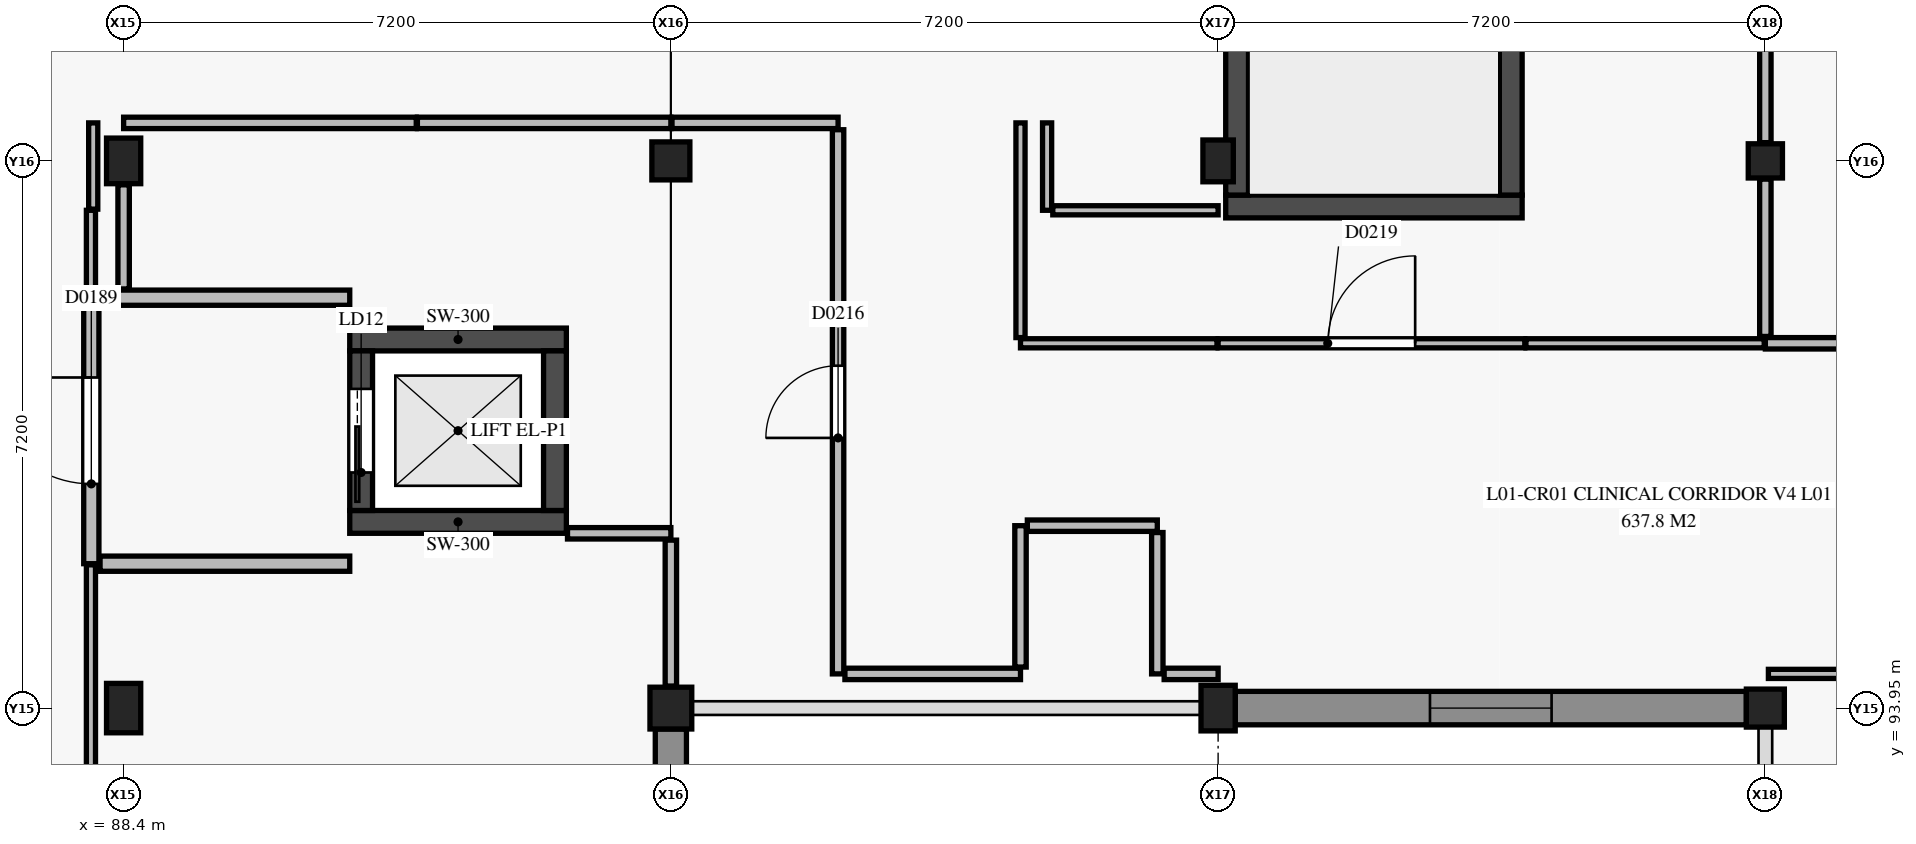
"""IFC4 building model, lengths in metres.
Left out: names, types, materials, properties, quantities, classifications, styles, units other than length and angle.
Written with IfcOpenShell. Run it as: python <this file> out.ifc"""

import sys

from ifc_helpers import new_model, si_unit, direction, frame, frame_2d, origin, origin_2d, place, context, subcontext, project, spatial, rectangle, extrude, element, fill, save


model = new_model("IFC4")
c1 = context("Model", 3, precision=1e-05, world=origin(), true_north=direction((0.0, 1.0)))
c2 = subcontext(c1, "Body", "Model", "MODEL_VIEW")
j1 = project(units=[si_unit("LENGTHUNIT", "METRE"), si_unit("PLANEANGLEUNIT", "RADIAN")], contexts=[c1])
p1 = place(None, origin())
s1 = spatial("IfcSite", under=j1, at=p1, CompositionType="ELEMENT")
p2 = place(p1, origin())
s2 = spatial("IfcBuilding", under=s1, at=p2, CompositionType="ELEMENT")
p3 = place(p2, frame((0.0, 0.0, 4.8)))
s3 = spatial("IfcBuildingStorey", under=s2, at=p3, CompositionType="ELEMENT", Elevation=4.8)
p4 = place(p3, frame((88.4, 93.95, 0.0), z_axis=(0.0, 0.0, 1.0), x_axis=(1.0, 0.0, 0.0)))
e1 = element("IfcColumn", 1, at=p4, inside=s3, PredefinedType="COLUMN", context=c2, shape_type="SweptSolid", body=[
    extrude(rectangle(XDim=0.45, YDim=0.65, at=origin_2d()), origin(), (0.0, 0.0, 1.0), 4.2),
])
p5 = place(p3, frame((88.4, 101.15, 0.0), z_axis=(0.0, 0.0, 1.0), x_axis=(1.0, 0.0, 0.0)))
e2 = element("IfcColumn", 2, at=p5, inside=s3, PredefinedType="COLUMN", context=c2, shape_type="SweptSolid", body=[
    extrude(rectangle(XDim=0.45, YDim=0.6, at=origin_2d()), origin(), (0.0, 0.0, 1.0), 4.2),
])
p6 = place(p3, frame((95.6, 93.95, 0.0), z_axis=(0.0, 0.0, 1.0), x_axis=(1.0, 0.0, 0.0)))
e3 = element("IfcColumn", 3, at=p6, inside=s3, PredefinedType="COLUMN", context=c2, shape_type="SweptSolid", body=[
    extrude(rectangle(XDim=0.55, YDim=0.55, at=origin_2d()), origin(), (0.0, 0.0, 1.0), 4.2),
])
p7 = place(p3, frame((95.6, 101.15, 0.0), z_axis=(0.0, 0.0, 1.0), x_axis=(1.0, 0.0, 0.0)))
e4 = element("IfcColumn", 4, at=p7, inside=s3, PredefinedType="COLUMN", context=c2, shape_type="SweptSolid", body=[
    extrude(rectangle(XDim=0.5, YDim=0.5, at=origin_2d()), origin(), (0.0, 0.0, 1.0), 4.2),
])
p8 = place(p3, frame((102.8, 93.95, 0.0), z_axis=(0.0, 0.0, 1.0), x_axis=(1.0, 0.0, 0.0)))
e5 = element("IfcColumn", 5, at=p8, inside=s3, PredefinedType="COLUMN", context=c2, shape_type="SweptSolid", body=[
    extrude(rectangle(XDim=0.45, YDim=0.6, at=origin_2d()), origin(), (0.0, 0.0, 1.0), 4.2),
])
p9 = place(p3, frame((102.8, 101.15, 0.0), z_axis=(0.0, 0.0, 1.0), x_axis=(1.0, 0.0, 0.0)))
e6 = element("IfcColumn", 6, at=p9, inside=s3, PredefinedType="COLUMN", context=c2, shape_type="SweptSolid", body=[
    extrude(rectangle(XDim=0.4, YDim=0.55, at=origin_2d()), origin(), (0.0, 0.0, 1.0), 4.2),
])
p10 = place(p3, frame((110.0, 93.95, 0.0), z_axis=(0.0, 0.0, 1.0), x_axis=(1.0, 0.0, 0.0)))
e7 = element("IfcColumn", 7, at=p10, inside=s3, PredefinedType="COLUMN", context=c2, shape_type="SweptSolid", body=[
    extrude(rectangle(XDim=0.5, YDim=0.5, at=origin_2d()), origin(), (0.0, 0.0, 1.0), 4.2),
])
p11 = place(p3, frame((110.0, 101.15, 0.0), z_axis=(0.0, 0.0, 1.0), x_axis=(1.0, 0.0, 0.0)))
e8 = element("IfcColumn", 8, at=p11, inside=s3, PredefinedType="COLUMN", context=c2, shape_type="SweptSolid", body=[
    extrude(rectangle(XDim=0.45, YDim=0.45, at=origin_2d()), origin(), (0.0, 0.0, 1.0), 4.2),
])
p12 = place(p3, frame((102.9, 100.55, 0.0), z_axis=(0.0, 0.0, 1.0), x_axis=(1.0, 0.0, 0.0)))
e9 = element("IfcWall", 9, at=p12, inside=s3, PredefinedType="SHEAR", context=c2, shape_type="SweptSolid", body=[
    extrude(rectangle(XDim=3.9, YDim=0.3, at=frame_2d((1.95, 0.0))), origin(), (0.0, 0.0, 1.0), 3.95),
])
p13 = place(p3, frame((103.05, 100.7, 0.0), z_axis=(0.0, 0.0, 1.0), x_axis=(0.0, 1.0, 0.0)))
e10 = element("IfcWall", 10, at=p13, inside=s3, PredefinedType="SHEAR", context=c2, shape_type="SweptSolid", body=[
    extrude(rectangle(XDim=7.3, YDim=0.3, at=frame_2d((3.65, 0.0))), origin(), (0.0, 0.0, 1.0), 3.95),
])
p14 = place(p13, frame((5.68, 0.0, 0.0)))
e11 = element("IfcOpeningElement", 11, at=p14, cuts=e10, PredefinedType="OPENING", context=c2, shape_type="SweptSolid", body=[
    extrude(rectangle(XDim=1.5, YDim=2.15, at=frame_2d((0.75, 1.075))), frame((0.0, 0.16, 0.0), z_axis=(0.0, -1.0, 0.0), x_axis=(1.0, 0.0, 0.0)), (0.0, 0.0, 1.0), 0.32),
])
p15 = place(p3, frame((106.65, 100.7, 0.0), z_axis=(0.0, 0.0, 1.0), x_axis=(0.0, 1.0, 0.0)))
e12 = element("IfcWall", 12, at=p15, inside=s3, PredefinedType="SHEAR", context=c2, shape_type="SweptSolid", body=[
    extrude(rectangle(XDim=7.3, YDim=0.3, at=frame_2d((3.65, 0.0))), origin(), (0.0, 0.0, 1.0), 3.95),
])
for number, where, z_axis, x_axis in (
    (13, (91.375, 96.4, 0.0), (0.0, 0.0, 1.0), (1.0, 0.0, 0.0)),
    (14, (91.375, 98.8, 0.0), (0.0, 0.0, 1.0), (1.0, 0.0, 0.0)),
):
    element("IfcWall", number, at=place(p3, frame(where, z_axis=z_axis, x_axis=x_axis)), inside=s3, PredefinedType="SHEAR", context=c2, shape_type="SweptSolid", body=[
        extrude(rectangle(XDim=2.85, YDim=0.3, at=frame_2d((1.425, 0.0))), origin(), (0.0, 0.0, 1.0), 3.95),
    ])
p16 = place(p3, frame((91.525, 96.55, 0.0), z_axis=(0.0, 0.0, 1.0), x_axis=(0.0, 1.0, 0.0)))
e15 = element("IfcWall", 15, at=p16, inside=s3, PredefinedType="SHEAR", context=c2, shape_type="SweptSolid", body=[
    extrude(rectangle(XDim=2.1, YDim=0.3, at=frame_2d((1.05, 0.0))), origin(), (0.0, 0.0, 1.0), 3.95),
])
p17 = place(p16, frame((0.5, 0.0, 0.0)))
e16 = element("IfcOpeningElement", 16, at=p17, cuts=e15, PredefinedType="OPENING", context=c2, shape_type="SweptSolid", body=[
    extrude(rectangle(XDim=1.1, YDim=2.15, at=frame_2d((0.55, 1.075))), frame((0.0, 0.16, 0.0), z_axis=(0.0, -1.0, 0.0), x_axis=(1.0, 0.0, 0.0)), (0.0, 0.0, 1.0), 0.32),
])
p18 = place(p3, frame((94.075, 96.55, 0.0), z_axis=(0.0, 0.0, 1.0), x_axis=(0.0, 1.0, 0.0)))
e17 = element("IfcWall", 17, at=p18, inside=s3, PredefinedType="SHEAR", context=c2, shape_type="SweptSolid", body=[
    extrude(rectangle(XDim=2.1, YDim=0.3, at=frame_2d((1.05, 0.0))), origin(), (0.0, 0.0, 1.0), 3.95),
])
p19 = place(p3, frame((109.75, 93.95, 0.0), z_axis=(0.0, 0.0, 1.0), x_axis=(-1.0, 0.0, 0.0)))
e18 = element("IfcWall", 18, at=p19, inside=s3, PredefinedType="USERDEFINED", context=c2, shape_type="SweptSolid", body=[
    extrude(rectangle(XDim=6.725, YDim=0.44, at=frame_2d((3.363, 0.0))), origin(), (0.0, 0.0, 1.0), 3.13),
])
p20 = place(p19, frame((2.562, 0.0, 0.6)))
e19 = element("IfcOpeningElement", 19, at=p20, cuts=e18, PredefinedType="OPENING", context=c2, shape_type="SweptSolid", body=[
    extrude(rectangle(XDim=1.6, YDim=2.2, at=frame_2d((0.8, 1.1))), frame((0.0, 0.23, 0.0), z_axis=(0.0, -1.0, 0.0), x_axis=(1.0, 0.0, 0.0)), (0.0, 0.0, 1.0), 0.46),
])
p21 = place(p3, frame((95.6, 93.675, 0.0), z_axis=(0.0, 0.0, 1.0), x_axis=(0.0, -1.0, 0.0)))
e20 = element("IfcWall", 20, at=p21, inside=s3, PredefinedType="USERDEFINED", context=c2, shape_type="SweptSolid", body=[
    extrude(rectangle(XDim=6.625, YDim=0.41, at=frame_2d((3.312, 0.0))), origin(), (0.0, 0.0, 1.0), 3.13),
])
p22 = place(p21, frame((1.252, 0.0, 0.9)))
e21 = element("IfcOpeningElement", 21, at=p22, cuts=e20, PredefinedType="OPENING", context=c2, shape_type="SweptSolid", body=[
    extrude(rectangle(XDim=0.6, YDim=1.8, at=frame_2d((0.3, 0.9))), frame((0.0, 0.215, 0.0), z_axis=(0.0, -1.0, 0.0), x_axis=(1.0, 0.0, 0.0)), (0.0, 0.0, 1.0), 0.43),
])
p23 = place(p21, frame((4.51, 0.0, 0.9)))
e22 = element("IfcOpeningElement", 22, at=p23, cuts=e20, PredefinedType="OPENING", context=c2, shape_type="SweptSolid", body=[
    extrude(rectangle(XDim=0.75, YDim=1.8, at=frame_2d((0.375, 0.9))), frame((0.0, 0.215, 0.0), z_axis=(0.0, -1.0, 0.0), x_axis=(1.0, 0.0, 0.0)), (0.0, 0.0, 1.0), 0.43),
])
p24 = place(p3, frame((87.975, 95.85, 0.0), z_axis=(0.0, 0.0, 1.0), x_axis=(0.0, 1.0, 0.0)))
e23 = element("IfcWall", 23, at=p24, inside=s3, PredefinedType="PARTITIONING", context=c2, shape_type="SweptSolid", body=[
    extrude(rectangle(XDim=3.5, YDim=0.2, at=frame_2d((1.75, 0.0))), origin(), (0.0, 0.0, 1.0), 3.475),
])
p25 = place(p24, frame((1.05, 0.0, 0.0)))
e24 = element("IfcOpeningElement", 24, at=p25, cuts=e23, PredefinedType="OPENING", context=c2, shape_type="SweptSolid", body=[
    extrude(rectangle(XDim=1.4, YDim=2.2, at=frame_2d((0.7, 1.1))), frame((0.0, 0.11, 0.0), z_axis=(0.0, -1.0, 0.0), x_axis=(1.0, 0.0, 0.0)), (0.0, 0.0, 1.0), 0.22),
])
for number, where, z_axis, x_axis in (
    (25, (88.09, 99.35, 0.0), (0.0, 0.0, 1.0), (1.0, 0.0, 0.0)),
    (26, (88.09, 95.85, 0.0), (0.0, 0.0, 1.0), (1.0, 0.0, 0.0)),
):
    element("IfcWall", number, at=place(p3, frame(where, z_axis=z_axis, x_axis=x_axis)), inside=s3, PredefinedType="PARTITIONING", context=c2, shape_type="SweptSolid", body=[
        extrude(rectangle(XDim=3.285, YDim=0.2, at=frame_2d((1.643, 0.0))), origin(), (0.0, 0.0, 1.0), 3.355),
    ])
p26 = place(p3, frame((88.4, 101.65, 0.0), z_axis=(0.0, 0.0, 1.0), x_axis=(1.0, 0.0, 0.0)))
e27 = element("IfcWall", 27, at=p26, inside=s3, PredefinedType="PARTITIONING", context=c2, shape_type="SweptSolid", body=[
    extrude(rectangle(XDim=3.85, YDim=0.15, at=frame_2d((1.925, 0.0))), origin(), (0.0, 0.0, 1.0), 3.355),
])
p27 = place(p3, frame((92.265, 101.65, 0.0), z_axis=(0.0, 0.0, 1.0), x_axis=(1.0, 0.0, 0.0)))
e28 = element("IfcWall", 28, at=p27, inside=s3, PredefinedType="PARTITIONING", context=c2, shape_type="SweptSolid", body=[
    extrude(rectangle(XDim=3.335, YDim=0.15, at=frame_2d((1.667, 0.0))), origin(), (0.0, 0.0, 1.0), 3.215),
])
p28 = place(p3, frame((95.615, 101.65, 0.0), z_axis=(0.0, 0.0, 1.0), x_axis=(1.0, 0.0, 0.0)))
e29 = element("IfcWall", 29, at=p28, inside=s3, PredefinedType="PARTITIONING", context=c2, shape_type="SweptSolid", body=[
    extrude(rectangle(XDim=2.185, YDim=0.15, at=frame_2d((1.093, 0.0))), origin(), (0.0, 0.0, 1.0), 3.215),
])
p29 = place(p3, frame((97.8, 94.4, 0.0), z_axis=(0.0, 0.0, 1.0), x_axis=(0.0, 1.0, 0.0)))
e30 = element("IfcWall", 30, at=p29, inside=s3, PredefinedType="PARTITIONING", context=c2, shape_type="SweptSolid", body=[
    extrude(rectangle(XDim=7.16, YDim=0.15, at=frame_2d((3.58, 0.0))), origin(), (0.0, 0.0, 1.0), 3.355),
])
p30 = place(p29, frame((3.105, 0.0, 0.0)))
e31 = element("IfcOpeningElement", 31, at=p30, cuts=e30, PredefinedType="OPENING", context=c2, shape_type="SweptSolid", body=[
    extrude(rectangle(XDim=0.95, YDim=2.1, at=frame_2d((0.475, 1.05))), frame((0.0, 0.085, 0.0), z_axis=(0.0, -1.0, 0.0), x_axis=(1.0, 0.0, 0.0)), (0.0, 0.0, 1.0), 0.17),
])
p31 = place(p3, frame((97.89, 94.4, 0.0), z_axis=(0.0, 0.0, 1.0), x_axis=(1.0, 0.0, 0.0)))
e32 = element("IfcWall", 32, at=p31, inside=s3, PredefinedType="PARTITIONING", context=c2, shape_type="SweptSolid", body=[
    extrude(rectangle(XDim=2.31, YDim=0.15, at=frame_2d((1.155, 0.0))), origin(), (0.0, 0.0, 1.0), 3.95),
])
p32 = place(p3, frame((100.2, 94.49, 0.0), z_axis=(0.0, 0.0, 1.0), x_axis=(0.0, 1.0, 0.0)))
e33 = element("IfcWall", 33, at=p32, inside=s3, PredefinedType="PARTITIONING", context=c2, shape_type="SweptSolid", body=[
    extrude(rectangle(XDim=1.86, YDim=0.15, at=frame_2d((0.93, 0.0))), origin(), (0.0, 0.0, 1.0), 3.515),
])
p33 = place(p3, frame((100.29, 96.35, 0.0), z_axis=(0.0, 0.0, 1.0), x_axis=(1.0, 0.0, 0.0)))
e34 = element("IfcWall", 34, at=p33, inside=s3, PredefinedType="PARTITIONING", context=c2, shape_type="SweptSolid", body=[
    extrude(rectangle(XDim=1.71, YDim=0.15, at=frame_2d((0.855, 0.0))), origin(), (0.0, 0.0, 1.0), 3.515),
])
p34 = place(p3, frame((102.0, 94.4, 0.0), z_axis=(0.0, 0.0, 1.0), x_axis=(0.0, 1.0, 0.0)))
e35 = element("IfcWall", 35, at=p34, inside=s3, PredefinedType="PARTITIONING", context=c2, shape_type="SweptSolid", body=[
    extrude(rectangle(XDim=1.86, YDim=0.15, at=frame_2d((0.93, 0.0))), origin(), (0.0, 0.0, 1.0), 3.95),
])
p35 = place(p3, frame((102.09, 94.4, 0.0), z_axis=(0.0, 0.0, 1.0), x_axis=(1.0, 0.0, 0.0)))
e36 = element("IfcWall", 36, at=p35, inside=s3, PredefinedType="PARTITIONING", context=c2, shape_type="SweptSolid", body=[
    extrude(rectangle(XDim=0.71, YDim=0.15, at=frame_2d((0.355, 0.0))), origin(), (0.0, 0.0, 1.0), 3.285),
])
p36 = place(p3, frame((110.0, 98.75, 0.0), z_axis=(0.0, 0.0, 1.0), x_axis=(1.0, 0.0, 0.0)))
e37 = element("IfcWall", 37, at=p36, inside=s3, PredefinedType="PARTITIONING", context=c2, shape_type="SweptSolid", body=[
    extrude(rectangle(XDim=2.4, YDim=0.15, at=frame_2d((1.2, 0.0))), origin(), (0.0, 0.0, 1.0), 3.455),
])
p37 = place(p3, frame((87.97, 78.75, 0.0), z_axis=(0.0, 0.0, 1.0), x_axis=(0.0, 1.0, 0.0)))
e38 = element("IfcWall", 38, at=p37, inside=s3, PredefinedType="PARTITIONING", context=c2, shape_type="SweptSolid", body=[
    extrude(rectangle(XDim=17.085, YDim=0.12, at=frame_2d((8.542, 0.0))), origin(), (0.0, 0.0, 1.0), 3.285),
])
p38 = place(p37, frame((5.418, 0.0, 0.0)))
e39 = element("IfcOpeningElement", 39, at=p38, cuts=e38, PredefinedType="OPENING", context=c2, shape_type="SweptSolid", body=[
    extrude(rectangle(XDim=1.15, YDim=2.15, at=frame_2d((0.575, 1.075))), frame((0.0, 0.07, 0.0), z_axis=(0.0, -1.0, 0.0), x_axis=(1.0, 0.0, 0.0)), (0.0, 0.0, 1.0), 0.14),
])
for number, where, z_axis, x_axis in (
    (40, (87.97, 99.365, 0.0), (0.0, 0.0, 1.0), (0.0, 1.0, 0.0)),
    (41, (88.0, 100.515, 0.0), (0.0, 0.0, 1.0), (0.0, 1.0, 0.0)),
):
    element("IfcWall", number, at=place(p3, frame(where, z_axis=z_axis, x_axis=x_axis)), inside=s3, PredefinedType="PARTITIONING", context=c2, shape_type="SweptSolid", body=[
        extrude(rectangle(XDim=1.135, YDim=0.12, at=frame_2d((0.567, 0.0))), origin(), (0.0, 0.0, 1.0), 3.95),
    ])
p39 = place(p3, frame((110.04, 94.4, 0.0), z_axis=(0.0, 0.0, 1.0), x_axis=(1.0, 0.0, 0.0)))
e42 = element("IfcWall", 42, at=p39, inside=s3, PredefinedType="PARTITIONING", context=c2, shape_type="SweptSolid", body=[
    extrude(rectangle(XDim=2.285, YDim=0.12, at=frame_2d((1.143, 0.0))), origin(), (0.0, 0.0, 1.0), 3.455),
])
p40 = place(p3, frame((100.55, 100.5, 0.0), z_axis=(0.0, 0.0, 1.0), x_axis=(0.0, 1.0, 0.0)))
e43 = element("IfcWall", 43, at=p40, inside=s3, PredefinedType="PARTITIONING", context=c2, shape_type="SweptSolid", body=[
    extrude(rectangle(XDim=1.15, YDim=0.12, at=frame_2d((0.575, 0.0))), origin(), (0.0, 0.0, 1.0), 3.355),
])
p41 = place(p3, frame((100.625, 100.5, 0.0), z_axis=(0.0, 0.0, 1.0), x_axis=(1.0, 0.0, 0.0)))
e44 = element("IfcWall", 44, at=p41, inside=s3, PredefinedType="PARTITIONING", context=c2, shape_type="SweptSolid", body=[
    extrude(rectangle(XDim=2.175, YDim=0.12, at=frame_2d((1.087, 0.0))), origin(), (0.0, 0.0, 1.0), 3.285),
])
p42 = place(p3, frame((106.85, 98.75, 0.0), z_axis=(0.0, 0.0, 1.0), x_axis=(1.0, 0.0, 0.0)))
e45 = element("IfcWall", 45, at=p42, inside=s3, PredefinedType="PARTITIONING", context=c2, shape_type="SweptSolid", body=[
    extrude(rectangle(XDim=3.135, YDim=0.12, at=frame_2d((1.567, 0.0))), origin(), (0.0, 0.0, 1.0), 3.455),
])
p43 = place(p3, frame((102.8, 98.75, 0.0), z_axis=(0.0, 0.0, 1.0), x_axis=(1.0, 0.0, 0.0)))
e46 = element("IfcWall", 46, at=p43, inside=s3, PredefinedType="PARTITIONING", context=c2, shape_type="SweptSolid", body=[
    extrude(rectangle(XDim=4.035, YDim=0.12, at=frame_2d((2.018, 0.0))), origin(), (0.0, 0.0, 1.0), 3.285),
])
p44 = place(p43, frame((1.442, 0.0, 0.0)))
e47 = element("IfcOpeningElement", 47, at=p44, cuts=e46, PredefinedType="OPENING", context=c2, shape_type="SweptSolid", body=[
    extrude(rectangle(XDim=1.15, YDim=2.15, at=frame_2d((0.575, 1.075))), frame((0.0, 0.07, 0.0), z_axis=(0.0, -1.0, 0.0), x_axis=(1.0, 0.0, 0.0)), (0.0, 0.0, 1.0), 0.14),
])
p45 = place(p3, frame((100.2, 98.75, 0.0), z_axis=(0.0, 0.0, 1.0), x_axis=(1.0, 0.0, 0.0)))
e48 = element("IfcWall", 48, at=p45, inside=s3, PredefinedType="PARTITIONING", context=c2, shape_type="SweptSolid", body=[
    extrude(rectangle(XDim=2.585, YDim=0.12, at=frame_2d((1.292, 0.0))), origin(), (0.0, 0.0, 1.0), 3.285),
])
p46 = place(p3, frame((100.2, 98.825, 0.0), z_axis=(0.0, 0.0, 1.0), x_axis=(0.0, 1.0, 0.0)))
e49 = element("IfcWall", 49, at=p46, inside=s3, PredefinedType="PARTITIONING", context=c2, shape_type="SweptSolid", body=[
    extrude(rectangle(XDim=2.825, YDim=0.12, at=frame_2d((1.413, 0.0))), origin(), (0.0, 0.0, 1.0), 3.355),
])
p47 = place(p3, frame((88.4, 99.465, 0.0), z_axis=(0.0, 0.0, 1.0), x_axis=(0.0, 1.0, 0.0)))
e50 = element("IfcWall", 50, at=p47, inside=s3, PredefinedType="PARTITIONING", context=c2, shape_type="SweptSolid", body=[
    extrude(rectangle(XDim=1.37, YDim=0.15, at=frame_2d((0.685, 0.0))), origin(), (0.0, 0.0, 1.0), 3.355),
])
p48 = place(p3, frame((94.24, 96.25, 0.0), z_axis=(0.0, 0.0, 1.0), x_axis=(1.0, 0.0, 0.0)))
e51 = element("IfcWall", 51, at=p48, inside=s3, PredefinedType="PARTITIONING", context=c2, shape_type="SweptSolid", body=[
    extrude(rectangle(XDim=1.36, YDim=0.15, at=frame_2d((0.68, 0.0))), origin(), (0.0, 0.0, 1.0), 3.455),
])
p49 = place(p3, frame((95.6, 94.24, 0.0), z_axis=(0.0, 0.0, 1.0), x_axis=(0.0, 1.0, 0.0)))
e52 = element("IfcWall", 52, at=p49, inside=s3, PredefinedType="PARTITIONING", context=c2, shape_type="SweptSolid", body=[
    extrude(rectangle(XDim=1.92, YDim=0.15, at=frame_2d((0.96, 0.0))), origin(), (0.0, 0.0, 1.0), 3.455),
])
p50 = place(p3, frame((110.0, 98.84, 0.0), z_axis=(0.0, 0.0, 1.0), x_axis=(0.0, 1.0, 0.0)))
e53 = element("IfcWall", 53, at=p50, inside=s3, PredefinedType="PARTITIONING", context=c2, shape_type="SweptSolid", body=[
    extrude(rectangle(XDim=2.07, YDim=0.15, at=frame_2d((1.035, 0.0))), origin(), (0.0, 0.0, 1.0), 3.455),
])
p51 = place(p3, frame((110.0, 101.39, 0.0), z_axis=(0.0, 0.0, 1.0), x_axis=(0.0, 1.0, 0.0)))
e54 = element("IfcWall", 54, at=p51, inside=s3, PredefinedType="PARTITIONING", context=c2, shape_type="SweptSolid", body=[
    extrude(rectangle(XDim=6.745, YDim=0.15, at=frame_2d((3.373, 0.0))), origin(), (0.0, 0.0, 1.0), 3.215),
])
p52 = place(p20, origin())
e55 = element("IfcWindow", 55, at=p52, inside=s3, PartitioningType="SINGLE_PANEL", PredefinedType="WINDOW", context=c2, shape_type="SweptSolid", body=[
    extrude(rectangle(XDim=1.6, YDim=2.2, at=frame_2d((0.8, 1.1))), frame((0.0, 0.03, 0.0), z_axis=(0.0, -1.0, 0.0), x_axis=(1.0, 0.0, 0.0)), (0.0, 0.0, 1.0), 0.06),
])
fill(e19, e55)
p53 = place(p17, origin())
e56 = element("IfcDoor", 56, at=p53, inside=s3, OperationType="SLIDING_TO_LEFT", PredefinedType="DOOR", context=c2, shape_type="SweptSolid", body=[
    extrude(rectangle(XDim=1.1, YDim=2.15, at=frame_2d((0.55, 1.075))), frame((0.0, 0.025, 0.0), z_axis=(0.0, -1.0, 0.0), x_axis=(1.0, 0.0, 0.0)), (0.0, 0.0, 1.0), 0.05),
])
fill(e16, e56)
p54 = place(p25, origin())
e57 = element("IfcDoor", 57, at=p54, inside=s3, OperationType="SINGLE_SWING_RIGHT", PredefinedType="DOOR", context=c2, shape_type="SweptSolid", body=[
    extrude(rectangle(XDim=1.4, YDim=2.2, at=frame_2d((0.7, 1.1))), frame((0.0, 0.025, 0.0), z_axis=(0.0, -1.0, 0.0), x_axis=(1.0, 0.0, 0.0)), (0.0, 0.0, 1.0), 0.05),
])
fill(e24, e57)
p55 = place(p30, origin())
e58 = element("IfcDoor", 58, at=p55, inside=s3, OperationType="SINGLE_SWING_LEFT", PredefinedType="DOOR", context=c2, shape_type="SweptSolid", body=[
    extrude(rectangle(XDim=0.95, YDim=2.1, at=frame_2d((0.475, 1.05))), frame((0.0, 0.025, 0.0), z_axis=(0.0, -1.0, 0.0), x_axis=(1.0, 0.0, 0.0)), (0.0, 0.0, 1.0), 0.05),
])
fill(e31, e58)
p56 = place(p44, origin())
e59 = element("IfcDoor", 59, at=p56, inside=s3, OperationType="SINGLE_SWING_RIGHT", PredefinedType="DOOR", context=c2, shape_type="SweptSolid", body=[
    extrude(rectangle(XDim=1.15, YDim=2.15, at=frame_2d((0.575, 1.075))), frame((0.0, 0.025, 0.0), z_axis=(0.0, -1.0, 0.0), x_axis=(1.0, 0.0, 0.0)), (0.0, 0.0, 1.0), 0.05),
])
fill(e47, e59)
save(model, sys.argv[1])
